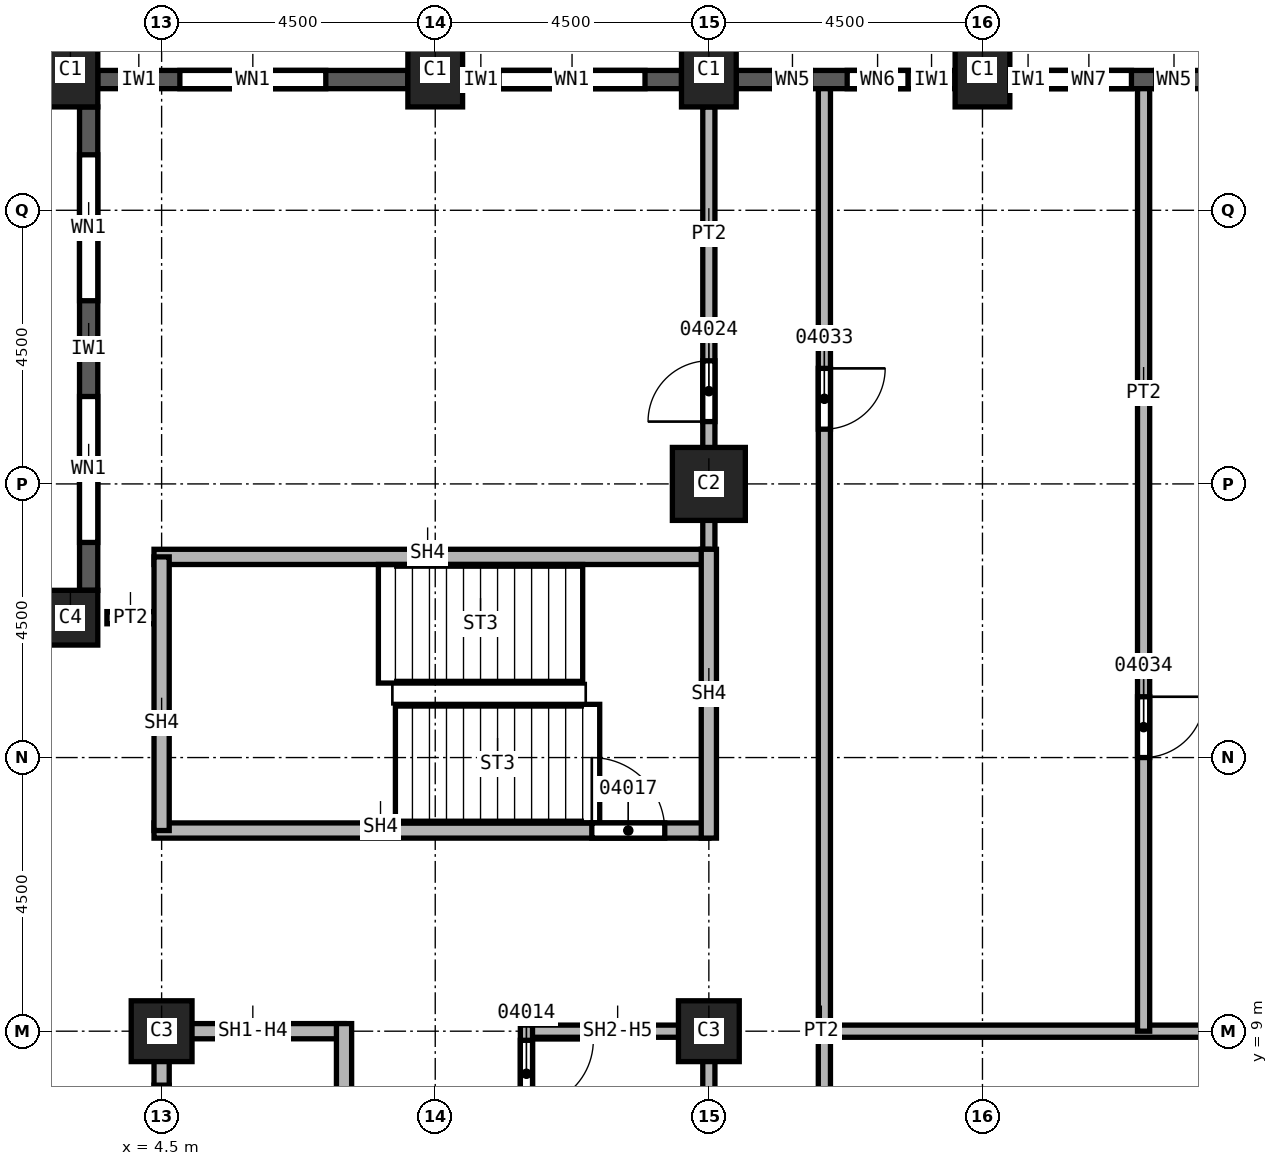
"""IFC4 building model, lengths in metres.
Left out: names, types, materials, properties, quantities, classifications, styles, units other than length and angle.
Written with IfcOpenShell. Run it as: python <this file> out.ifc"""

import sys

from ifc_helpers import new_model, si_unit, direction, frame, frame_2d, origin, origin_2d, place, context, subcontext, project, spatial, rectangle, extrude, element, fill, save


model = new_model("IFC4")
c1 = context("Model", 3, precision=1e-05, world=origin(), true_north=direction((0.0, 1.0)))
c2 = subcontext(c1, "Body", "Model", "MODEL_VIEW")
j1 = project(units=[si_unit("LENGTHUNIT", "METRE"), si_unit("PLANEANGLEUNIT", "RADIAN")], contexts=[c1])
p1 = place(None, origin())
s1 = spatial("IfcSite", under=j1, at=p1, CompositionType="ELEMENT")
p2 = place(p1, origin())
s2 = spatial("IfcBuilding", under=s1, at=p2, CompositionType="ELEMENT")
p3 = place(p2, frame((0.0, 0.0, 108.0)))
s3 = spatial("IfcBuildingStorey", under=s2, at=p3, CompositionType="ELEMENT", Elevation=108.0)
p4 = place(p3, frame((13.5, 18.0, 0.0), z_axis=(0.0, 0.0, 1.0), x_axis=(1.0, 0.0, 0.0)))
e1 = element("IfcColumn", 1, at=p4, inside=s3, PredefinedType="COLUMN", context=c2, shape_type="SweptSolid", body=[
    extrude(rectangle(XDim=1.2, YDim=1.2, at=origin_2d()), origin(), (0.0, 0.0, 1.0), 3.7),
])
for number, where, z_axis, x_axis in (
    (2, (4.5, 9.0, 0.0), (0.0, 0.0, 1.0), (1.0, 0.0, 0.0)),
    (3, (13.5, 9.0, 0.0), (0.0, 0.0, 1.0), (1.0, 0.0, 0.0)),
):
    element("IfcColumn", number, at=place(p3, frame(where, z_axis=z_axis, x_axis=x_axis)), inside=s3, PredefinedType="COLUMN", context=c2, shape_type="SweptSolid", body=[
        extrude(rectangle(XDim=1.0, YDim=1.0, at=origin_2d()), origin(), (0.0, 0.0, 1.0), 3.7),
    ])
for number, where, z_axis, x_axis in (
    (4, (3.0, 24.8, 0.0), (0.0, 0.0, 1.0), (1.0, 0.0, 0.0)),
    (5, (9.0, 24.8, 0.0), (0.0, 0.0, 1.0), (1.0, 0.0, 0.0)),
    (6, (13.5, 24.8, 0.0), (0.0, 0.0, 1.0), (1.0, 0.0, 0.0)),
    (7, (18.0, 24.8, 0.0), (0.0, 0.0, 1.0), (1.0, 0.0, 0.0)),
):
    element("IfcColumn", number, at=place(p3, frame(where, z_axis=z_axis, x_axis=x_axis)), inside=s3, PredefinedType="COLUMN", context=c2, shape_type="SweptSolid", body=[
        extrude(rectangle(XDim=0.9, YDim=1.2, at=origin_2d()), origin(), (0.0, 0.0, 1.0), 3.7),
    ])
p5 = place(p3, frame((3.0, 15.8, 0.0), z_axis=(0.0, 0.0, 1.0), x_axis=(1.0, 0.0, 0.0)))
e8 = element("IfcColumn", 8, at=p5, inside=s3, PredefinedType="COLUMN", context=c2, shape_type="SweptSolid", body=[
    extrude(rectangle(XDim=0.9, YDim=0.9, at=origin_2d()), origin(), (0.0, 0.0, 1.0), 3.7),
])
p6 = place(p3, frame((22.05, 24.65, 0.0), z_axis=(0.0, 0.0, 1.0), x_axis=(-1.0, 0.0, 0.0)))
e9 = element("IfcWall", 9, at=p6, inside=s3, PredefinedType="SOLIDWALL", context=c2, shape_type="SweptSolid", body=[
    extrude(rectangle(XDim=3.6, YDim=0.3, at=frame_2d((1.8, 0.0))), origin(), (0.0, 0.0, 1.0), 3.1),
])
p7 = place(p6, frame((0.6, 0.0, 0.8)))
e10 = element("IfcOpeningElement", 10, at=p7, cuts=e9, PredefinedType="OPENING", context=c2, shape_type="SweptSolid", body=[
    extrude(rectangle(XDim=0.6, YDim=1.95, at=frame_2d((0.3, 0.975))), frame((0.0, 0.15, 0.0), z_axis=(0.0, -1.0, 0.0), x_axis=(1.0, 0.0, 0.0)), (0.0, 0.0, 1.0), 0.3),
])
p8 = place(p6, frame((1.6, 0.0, 0.8)))
e11 = element("IfcOpeningElement", 11, at=p8, cuts=e9, PredefinedType="OPENING", context=c2, shape_type="SweptSolid", body=[
    extrude(rectangle(XDim=1.4, YDim=1.95, at=frame_2d((0.7, 0.975))), frame((0.0, 0.15, 0.0), z_axis=(0.0, -1.0, 0.0), x_axis=(1.0, 0.0, 0.0)), (0.0, 0.0, 1.0), 0.3),
])
p9 = place(p3, frame((17.55, 24.65, 0.0), z_axis=(0.0, 0.0, 1.0), x_axis=(-1.0, 0.0, 0.0)))
e12 = element("IfcWall", 12, at=p9, inside=s3, PredefinedType="SOLIDWALL", context=c2, shape_type="SweptSolid", body=[
    extrude(rectangle(XDim=3.6, YDim=0.3, at=frame_2d((1.8, 0.0))), origin(), (0.0, 0.0, 1.0), 3.1),
])
p10 = place(p9, frame((0.775, 0.0, 0.8)))
e13 = element("IfcOpeningElement", 13, at=p10, cuts=e12, PredefinedType="OPENING", context=c2, shape_type="SweptSolid", body=[
    extrude(rectangle(XDim=1.0, YDim=1.95, at=frame_2d((0.5, 0.975))), frame((0.0, 0.15, 0.0), z_axis=(0.0, -1.0, 0.0), x_axis=(1.0, 0.0, 0.0)), (0.0, 0.0, 1.0), 0.3),
])
p11 = place(p9, frame((2.375, 0.0, 0.8)))
e14 = element("IfcOpeningElement", 14, at=p11, cuts=e12, PredefinedType="OPENING", context=c2, shape_type="SweptSolid", body=[
    extrude(rectangle(XDim=0.6, YDim=1.95, at=frame_2d((0.3, 0.975))), frame((0.0, 0.15, 0.0), z_axis=(0.0, -1.0, 0.0), x_axis=(1.0, 0.0, 0.0)), (0.0, 0.0, 1.0), 0.3),
])
p12 = place(p3, frame((13.05, 24.65, 0.0), z_axis=(0.0, 0.0, 1.0), x_axis=(-1.0, 0.0, 0.0)))
e15 = element("IfcWall", 15, at=p12, inside=s3, PredefinedType="SOLIDWALL", context=c2, shape_type="SweptSolid", body=[
    extrude(rectangle(XDim=3.6, YDim=0.3, at=frame_2d((1.8, 0.0))), origin(), (0.0, 0.0, 1.0), 3.1),
])
p13 = place(p12, frame((0.6, 0.0, 0.8)))
e16 = element("IfcOpeningElement", 16, at=p13, cuts=e15, PredefinedType="OPENING", context=c2, shape_type="SweptSolid", body=[
    extrude(rectangle(XDim=2.4, YDim=1.95, at=frame_2d((1.2, 0.975))), frame((0.0, 0.15, 0.0), z_axis=(0.0, -1.0, 0.0), x_axis=(1.0, 0.0, 0.0)), (0.0, 0.0, 1.0), 0.3),
])
p14 = place(p3, frame((8.55, 24.65, 0.0), z_axis=(0.0, 0.0, 1.0), x_axis=(-1.0, 0.0, 0.0)))
e17 = element("IfcWall", 17, at=p14, inside=s3, PredefinedType="SOLIDWALL", context=c2, shape_type="SweptSolid", body=[
    extrude(rectangle(XDim=5.1, YDim=0.3, at=frame_2d((2.55, 0.0))), origin(), (0.0, 0.0, 1.0), 3.1),
])
p15 = place(p14, frame((1.35, 0.0, 0.8)))
e18 = element("IfcOpeningElement", 18, at=p15, cuts=e17, PredefinedType="OPENING", context=c2, shape_type="SweptSolid", body=[
    extrude(rectangle(XDim=2.4, YDim=1.95, at=frame_2d((1.2, 0.975))), frame((0.0, 0.15, 0.0), z_axis=(0.0, -1.0, 0.0), x_axis=(1.0, 0.0, 0.0)), (0.0, 0.0, 1.0), 0.3),
])
p16 = place(p3, frame((3.3, 24.2, 0.0), z_axis=(0.0, 0.0, 1.0), x_axis=(0.0, -1.0, 0.0)))
e19 = element("IfcWall", 19, at=p16, inside=s3, PredefinedType="SOLIDWALL", context=c2, shape_type="SweptSolid", body=[
    extrude(rectangle(XDim=7.95, YDim=0.3, at=frame_2d((3.975, 0.0))), origin(), (0.0, 0.0, 1.0), 3.1),
])
p17 = place(p16, frame((0.788, 0.0, 0.8)))
e20 = element("IfcOpeningElement", 20, at=p17, cuts=e19, PredefinedType="OPENING", context=c2, shape_type="SweptSolid", body=[
    extrude(rectangle(XDim=2.4, YDim=1.95, at=frame_2d((1.2, 0.975))), frame((0.0, 0.15, 0.0), z_axis=(0.0, -1.0, 0.0), x_axis=(1.0, 0.0, 0.0)), (0.0, 0.0, 1.0), 0.3),
])
p18 = place(p16, frame((4.762, 0.0, 0.8)))
e21 = element("IfcOpeningElement", 21, at=p18, cuts=e19, PredefinedType="OPENING", context=c2, shape_type="SweptSolid", body=[
    extrude(rectangle(XDim=2.4, YDim=1.95, at=frame_2d((1.2, 0.975))), frame((0.0, 0.15, 0.0), z_axis=(0.0, -1.0, 0.0), x_axis=(1.0, 0.0, 0.0)), (0.0, 0.0, 1.0), 0.3),
])
p19 = place(p3, frame((3.6, 15.8, 0.0), z_axis=(0.0, 0.0, 1.0), x_axis=(1.0, 0.0, 0.0)))
e22 = element("IfcWall", 22, at=p19, inside=s3, PredefinedType="PARTITIONING", context=c2, shape_type="SweptSolid", body=[
    extrude(rectangle(XDim=0.9, YDim=0.2, at=frame_2d((0.45, 0.0))), origin(), (0.0, 0.0, 1.0), 3.7),
])
p20 = place(p3, frame((13.5, 16.675, 0.0), z_axis=(0.0, 0.0, 1.0), x_axis=(0.0, 1.0, 0.0)))
e23 = element("IfcWall", 23, at=p20, inside=s3, PredefinedType="PARTITIONING", context=c2, shape_type="SweptSolid", body=[
    extrude(rectangle(XDim=7.525, YDim=0.2, at=frame_2d((3.762, 0.0))), origin(), (0.0, 0.0, 1.0), 3.7),
])
p21 = place(p20, frame((2.35, 0.0, 0.0)))
e24 = element("IfcOpeningElement", 24, at=p21, cuts=e23, PredefinedType="OPENING", context=c2, shape_type="SweptSolid", body=[
    extrude(rectangle(XDim=1.0, YDim=2.1, at=frame_2d((0.5, 1.05))), frame((0.0, 0.1, 0.0), z_axis=(0.0, -1.0, 0.0), x_axis=(1.0, 0.0, 0.0)), (0.0, 0.0, 1.0), 0.2),
])
p22 = place(p3, frame((15.4, 9.0, 0.0), z_axis=(0.0, 0.0, 1.0), x_axis=(1.0, 0.0, 0.0)))
e25 = element("IfcWall", 25, at=p22, inside=s3, PredefinedType="PARTITIONING", context=c2, shape_type="SweptSolid", body=[
    extrude(rectangle(XDim=11.7, YDim=0.2, at=frame_2d((5.85, 0.0))), origin(), (0.0, 0.0, 1.0), 3.7),
])
p23 = place(p3, frame((15.4, 24.5, 0.0), z_axis=(0.0, 0.0, 1.0), x_axis=(0.0, -1.0, 0.0)))
e26 = element("IfcWall", 26, at=p23, inside=s3, PredefinedType="PARTITIONING", context=c2, shape_type="SweptSolid", body=[
    extrude(rectangle(XDim=25.35, YDim=0.2, at=frame_2d((12.675, 0.0))), origin(), (0.0, 0.0, 1.0), 3.7),
])
p24 = place(p23, frame((4.6, 0.0, 0.0)))
e27 = element("IfcOpeningElement", 27, at=p24, cuts=e26, PredefinedType="OPENING", context=c2, shape_type="SweptSolid", body=[
    extrude(rectangle(XDim=1.0, YDim=2.1, at=frame_2d((0.5, 1.05))), frame((0.0, 0.1, 0.0), z_axis=(0.0, -1.0, 0.0), x_axis=(1.0, 0.0, 0.0)), (0.0, 0.0, 1.0), 0.2),
])
p25 = place(p3, frame((20.65, 24.5, 0.0), z_axis=(0.0, 0.0, 1.0), x_axis=(0.0, -1.0, 0.0)))
e28 = element("IfcWall", 28, at=p25, inside=s3, PredefinedType="PARTITIONING", context=c2, shape_type="SweptSolid", body=[
    extrude(rectangle(XDim=15.5, YDim=0.2, at=frame_2d((7.75, 0.0))), origin(), (0.0, 0.0, 1.0), 3.7),
])
p26 = place(p25, frame((10.0, 0.0, 0.0)))
e29 = element("IfcOpeningElement", 29, at=p26, cuts=e28, PredefinedType="OPENING", context=c2, shape_type="SweptSolid", body=[
    extrude(rectangle(XDim=1.0, YDim=2.1, at=frame_2d((0.5, 1.05))), frame((0.0, 0.1, 0.0), z_axis=(0.0, -1.0, 0.0), x_axis=(1.0, 0.0, 0.0)), (0.0, 0.0, 1.0), 0.2),
])
p27 = place(p3, frame((10.5, 9.0, 0.0), z_axis=(0.0, 0.0, 1.0), x_axis=(1.0, 0.0, 0.0)))
e30 = element("IfcWall", 30, at=p27, inside=s3, PredefinedType="SOLIDWALL", context=c2, shape_type="SweptSolid", body=[
    extrude(rectangle(XDim=3.0, YDim=0.2, at=frame_2d((1.5, 0.0))), origin(), (0.0, 0.0, 1.0), 2.938),
])
p28 = place(p3, frame((10.5, 9.1, 0.0), z_axis=(0.0, 0.0, 1.0), x_axis=(0.0, -1.0, 0.0)))
e31 = element("IfcWall", 31, at=p28, inside=s3, PredefinedType="SOLIDWALL", context=c2, shape_type="SweptSolid", body=[
    extrude(rectangle(XDim=3.225, YDim=0.2, at=frame_2d((1.613, 0.0))), origin(), (0.0, 0.0, 1.0), 3.7),
])
p29 = place(p28, frame((0.25, 0.0, 0.0)))
e32 = element("IfcOpeningElement", 32, at=p29, cuts=e31, PredefinedType="OPENING", context=c2, shape_type="SweptSolid", body=[
    extrude(rectangle(XDim=1.1, YDim=2.1, at=frame_2d((0.55, 1.05))), frame((0.0, 0.1, 0.0), z_axis=(0.0, -1.0, 0.0), x_axis=(1.0, 0.0, 0.0)), (0.0, 0.0, 1.0), 0.2),
])
p30 = place(p3, frame((13.5, 9.1, 0.0), z_axis=(0.0, 0.0, 1.0), x_axis=(0.0, -1.0, 0.0)))
e33 = element("IfcWall", 33, at=p30, inside=s3, PredefinedType="SOLIDWALL", context=c2, shape_type="SweptSolid", body=[
    extrude(rectangle(XDim=3.1, YDim=0.2, at=frame_2d((1.55, 0.0))), origin(), (0.0, 0.0, 1.0), 2.938),
])
p31 = place(p3, frame((4.5, 0.0, 0.0), z_axis=(0.0, 0.0, 1.0), x_axis=(0.0, 1.0, 0.0)))
e34 = element("IfcWall", 34, at=p31, inside=s3, PredefinedType="SOLIDWALL", context=c2, shape_type="SweptSolid", body=[
    extrude(rectangle(XDim=9.125, YDim=0.25, at=frame_2d((4.562, 0.0))), origin(), (0.0, 0.0, 1.0), 2.938),
])
p32 = place(p31, frame((0.95, 0.0, 0.0)))
e35 = element("IfcOpeningElement", 35, at=p32, cuts=e34, PredefinedType="OPENING", context=c2, shape_type="SweptSolid", body=[
    extrude(rectangle(XDim=1.1, YDim=2.1, at=frame_2d((0.55, 1.05))), frame((0.0, 0.125, 0.0), z_axis=(0.0, -1.0, 0.0), x_axis=(1.0, 0.0, 0.0)), (0.0, 0.0, 1.0), 0.25),
])
p33 = place(p31, frame((3.95, 0.0, 0.0)))
e36 = element("IfcOpeningElement", 36, at=p33, cuts=e34, PredefinedType="OPENING", context=c2, shape_type="SweptSolid", body=[
    extrude(rectangle(XDim=1.1, YDim=2.1, at=frame_2d((0.55, 1.05))), frame((0.0, 0.125, 0.0), z_axis=(0.0, -1.0, 0.0), x_axis=(1.0, 0.0, 0.0)), (0.0, 0.0, 1.0), 0.25),
])
p34 = place(p31, frame((7.012, 0.0, 0.0)))
e37 = element("IfcOpeningElement", 37, at=p34, cuts=e34, PredefinedType="OPENING", context=c2, shape_type="SweptSolid", body=[
    extrude(rectangle(XDim=1.1, YDim=2.1, at=frame_2d((0.55, 1.05))), frame((0.0, 0.125, 0.0), z_axis=(0.0, -1.0, 0.0), x_axis=(1.0, 0.0, 0.0)), (0.0, 0.0, 1.0), 0.25),
])
p35 = place(p3, frame((4.5, 9.0, 0.0), z_axis=(0.0, 0.0, 1.0), x_axis=(1.0, 0.0, 0.0)))
e38 = element("IfcWall", 38, at=p35, inside=s3, PredefinedType="SOLIDWALL", context=c2, shape_type="SweptSolid", body=[
    extrude(rectangle(XDim=3.0, YDim=0.25, at=frame_2d((1.5, 0.0))), origin(), (0.0, 0.0, 1.0), 2.938),
])
p36 = place(p3, frame((7.5, 9.125, 0.0), z_axis=(0.0, 0.0, 1.0), x_axis=(0.0, -1.0, 0.0)))
e39 = element("IfcWall", 39, at=p36, inside=s3, PredefinedType="SOLIDWALL", context=c2, shape_type="SweptSolid", body=[
    extrude(rectangle(XDim=12.25, YDim=0.25, at=frame_2d((6.125, 0.0))), origin(), (0.0, 0.0, 1.0), 3.7),
])
p37 = place(p3, frame((4.375, 12.3, 0.0), z_axis=(0.0, 0.0, 1.0), x_axis=(1.0, 0.0, 0.0)))
e40 = element("IfcWall", 40, at=p37, inside=s3, PredefinedType="SOLIDWALL", context=c2, shape_type="SweptSolid", body=[
    extrude(rectangle(XDim=9.125, YDim=0.25, at=frame_2d((4.562, 0.0))), origin(), (0.0, 0.0, 1.0), 3.7),
])
p38 = place(p37, frame((7.2, 0.0, 0.0)))
e41 = element("IfcOpeningElement", 41, at=p38, cuts=e40, PredefinedType="OPENING", context=c2, shape_type="SweptSolid", body=[
    extrude(rectangle(XDim=1.2, YDim=2.1, at=frame_2d((0.6, 1.05))), frame((0.0, 0.125, 0.0), z_axis=(0.0, -1.0, 0.0), x_axis=(1.0, 0.0, 0.0)), (0.0, 0.0, 1.0), 0.25),
])
p39 = place(p3, frame((4.375, 16.8, 0.0), z_axis=(0.0, 0.0, 1.0), x_axis=(1.0, 0.0, 0.0)))
e42 = element("IfcWall", 42, at=p39, inside=s3, PredefinedType="SOLIDWALL", context=c2, shape_type="SweptSolid", body=[
    extrude(rectangle(XDim=9.125, YDim=0.25, at=frame_2d((4.562, 0.0))), origin(), (0.0, 0.0, 1.0), 3.7),
])
p40 = place(p3, frame((4.5, 12.3, 0.0), z_axis=(0.0, 0.0, 1.0), x_axis=(0.0, 1.0, 0.0)))
e43 = element("IfcWall", 43, at=p40, inside=s3, PredefinedType="SOLIDWALL", context=c2, shape_type="SweptSolid", body=[
    extrude(rectangle(XDim=4.5, YDim=0.25, at=frame_2d((2.25, 0.0))), origin(), (0.0, 0.0, 1.0), 3.7),
])
p41 = place(p3, frame((13.5, 12.175, 0.0), z_axis=(0.0, 0.0, 1.0), x_axis=(0.0, 1.0, 0.0)))
e44 = element("IfcWall", 44, at=p41, inside=s3, PredefinedType="SOLIDWALL", context=c2, shape_type="SweptSolid", body=[
    extrude(rectangle(XDim=4.75, YDim=0.25, at=frame_2d((2.375, 0.0))), origin(), (0.0, 0.0, 1.0), 3.7),
])
p42 = place(p13, origin())
e45 = element("IfcWindow", 45, at=p42, inside=s3, PartitioningType="SINGLE_PANEL", PredefinedType="WINDOW", context=c2, shape_type="SweptSolid", body=[
    extrude(rectangle(XDim=2.4, YDim=1.95, at=frame_2d((1.2, 0.975))), frame((0.0, 0.03, 0.0), z_axis=(0.0, -1.0, 0.0), x_axis=(1.0, 0.0, 0.0)), (0.0, 0.0, 1.0), 0.06),
])
fill(e16, e45)
p43 = place(p15, origin())
e46 = element("IfcWindow", 46, at=p43, inside=s3, PartitioningType="SINGLE_PANEL", PredefinedType="WINDOW", context=c2, shape_type="SweptSolid", body=[
    extrude(rectangle(XDim=2.4, YDim=1.95, at=frame_2d((1.2, 0.975))), frame((0.0, 0.03, 0.0), z_axis=(0.0, -1.0, 0.0), x_axis=(1.0, 0.0, 0.0)), (0.0, 0.0, 1.0), 0.06),
])
fill(e18, e46)
p44 = place(p17, origin())
e47 = element("IfcWindow", 47, at=p44, inside=s3, PartitioningType="SINGLE_PANEL", PredefinedType="WINDOW", context=c2, shape_type="SweptSolid", body=[
    extrude(rectangle(XDim=2.4, YDim=1.95, at=frame_2d((1.2, 0.975))), frame((0.0, 0.03, 0.0), z_axis=(0.0, -1.0, 0.0), x_axis=(1.0, 0.0, 0.0)), (0.0, 0.0, 1.0), 0.06),
])
fill(e20, e47)
p45 = place(p18, origin())
e48 = element("IfcWindow", 48, at=p45, inside=s3, PartitioningType="SINGLE_PANEL", PredefinedType="WINDOW", context=c2, shape_type="SweptSolid", body=[
    extrude(rectangle(XDim=2.4, YDim=1.95, at=frame_2d((1.2, 0.975))), frame((0.0, 0.03, 0.0), z_axis=(0.0, -1.0, 0.0), x_axis=(1.0, 0.0, 0.0)), (0.0, 0.0, 1.0), 0.06),
])
fill(e21, e48)
p46 = place(p29, origin())
e49 = element("IfcDoor", 49, at=p46, inside=s3, OperationType="SINGLE_SWING_LEFT", PredefinedType="DOOR", context=c2, shape_type="SweptSolid", body=[
    extrude(rectangle(XDim=1.1, YDim=2.1, at=frame_2d((0.55, 1.05))), frame((0.0, 0.025, 0.0), z_axis=(0.0, -1.0, 0.0), x_axis=(1.0, 0.0, 0.0)), (0.0, 0.0, 1.0), 0.05),
])
fill(e32, e49)
p47 = place(p38, origin())
e50 = element("IfcDoor", 50, at=p47, inside=s3, OperationType="SINGLE_SWING_RIGHT", PredefinedType="DOOR", context=c2, shape_type="SweptSolid", body=[
    extrude(rectangle(XDim=1.2, YDim=2.1, at=frame_2d((0.6, 1.05))), frame((0.0, 0.025, 0.0), z_axis=(0.0, -1.0, 0.0), x_axis=(1.0, 0.0, 0.0)), (0.0, 0.0, 1.0), 0.05),
])
fill(e41, e50)
p48 = place(p21, origin())
e51 = element("IfcDoor", 51, at=p48, inside=s3, OperationType="SINGLE_SWING_LEFT", PredefinedType="DOOR", context=c2, shape_type="SweptSolid", body=[
    extrude(rectangle(XDim=1.0, YDim=2.1, at=frame_2d((0.5, 1.05))), frame((0.0, 0.025, 0.0), z_axis=(0.0, -1.0, 0.0), x_axis=(1.0, 0.0, 0.0)), (0.0, 0.0, 1.0), 0.05),
])
fill(e24, e51)
p49 = place(p24, origin())
e52 = element("IfcDoor", 52, at=p49, inside=s3, OperationType="SINGLE_SWING_RIGHT", PredefinedType="DOOR", context=c2, shape_type="SweptSolid", body=[
    extrude(rectangle(XDim=1.0, YDim=2.1, at=frame_2d((0.5, 1.05))), frame((0.0, 0.025, 0.0), z_axis=(0.0, -1.0, 0.0), x_axis=(1.0, 0.0, 0.0)), (0.0, 0.0, 1.0), 0.05),
])
fill(e27, e52)
p50 = place(p26, origin())
e53 = element("IfcDoor", 53, at=p50, inside=s3, OperationType="SINGLE_SWING_LEFT", PredefinedType="DOOR", context=c2, shape_type="SweptSolid", body=[
    extrude(rectangle(XDim=1.0, YDim=2.1, at=frame_2d((0.5, 1.05))), frame((0.0, 0.025, 0.0), z_axis=(0.0, -1.0, 0.0), x_axis=(1.0, 0.0, 0.0)), (0.0, 0.0, 1.0), 0.05),
])
fill(e29, e53)
p51 = place(p34, origin())
e54 = element("IfcDoor", 54, at=p51, inside=s3, OperationType="SLIDING_TO_LEFT", PredefinedType="DOOR", context=c2, shape_type="SweptSolid", body=[
    extrude(rectangle(XDim=1.1, YDim=2.1, at=frame_2d((0.55, 1.05))), frame((0.0, 0.025, 0.0), z_axis=(0.0, -1.0, 0.0), x_axis=(1.0, 0.0, 0.0)), (0.0, 0.0, 1.0), 0.05),
])
fill(e37, e54)
p52 = place(p7, origin())
e55 = element("IfcWindow", 55, at=p52, inside=s3, PartitioningType="SINGLE_PANEL", PredefinedType="WINDOW", context=c2, shape_type="SweptSolid", body=[
    extrude(rectangle(XDim=0.6, YDim=1.95, at=frame_2d((0.3, 0.975))), frame((0.0, 0.03, 0.0), z_axis=(0.0, -1.0, 0.0), x_axis=(1.0, 0.0, 0.0)), (0.0, 0.0, 1.0), 0.06),
])
fill(e10, e55)
p53 = place(p8, origin())
e56 = element("IfcWindow", 56, at=p53, inside=s3, PartitioningType="SINGLE_PANEL", PredefinedType="WINDOW", context=c2, shape_type="SweptSolid", body=[
    extrude(rectangle(XDim=1.4, YDim=1.95, at=frame_2d((0.7, 0.975))), frame((0.0, 0.03, 0.0), z_axis=(0.0, -1.0, 0.0), x_axis=(1.0, 0.0, 0.0)), (0.0, 0.0, 1.0), 0.06),
])
fill(e11, e56)
p54 = place(p10, origin())
e57 = element("IfcWindow", 57, at=p54, inside=s3, PartitioningType="SINGLE_PANEL", PredefinedType="WINDOW", context=c2, shape_type="SweptSolid", body=[
    extrude(rectangle(XDim=1.0, YDim=1.95, at=frame_2d((0.5, 0.975))), frame((0.0, 0.03, 0.0), z_axis=(0.0, -1.0, 0.0), x_axis=(1.0, 0.0, 0.0)), (0.0, 0.0, 1.0), 0.06),
])
fill(e13, e57)
p55 = place(p11, origin())
e58 = element("IfcWindow", 58, at=p55, inside=s3, PartitioningType="SINGLE_PANEL", PredefinedType="WINDOW", context=c2, shape_type="SweptSolid", body=[
    extrude(rectangle(XDim=0.6, YDim=1.95, at=frame_2d((0.3, 0.975))), frame((0.0, 0.03, 0.0), z_axis=(0.0, -1.0, 0.0), x_axis=(1.0, 0.0, 0.0)), (0.0, 0.0, 1.0), 0.06),
])
fill(e14, e58)
save(model, sys.argv[1])
